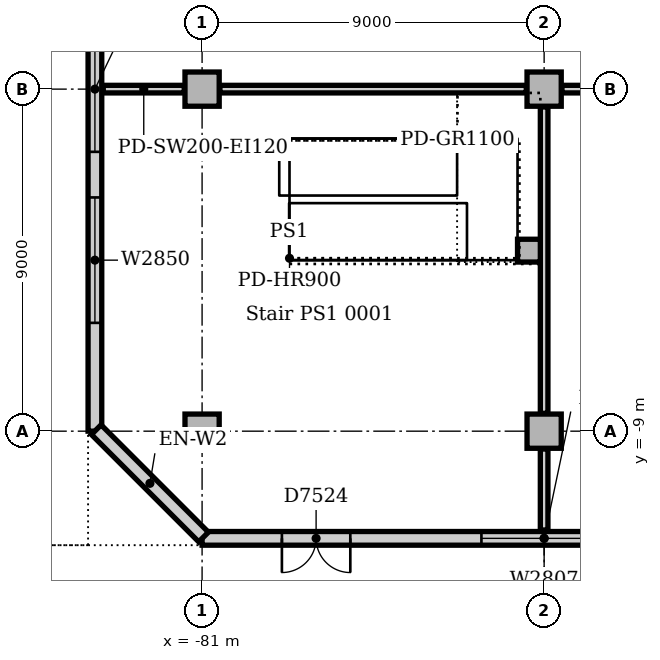
"""IFC4 building model, lengths in metres.
Left out: names, types, materials, properties, quantities, classifications, styles, units other than length and angle.
Written with IfcOpenShell. Run it as: python <this file> out.ifc"""

import sys

from ifc_helpers import new_model, si_unit, direction, frame, frame_2d, origin, origin_2d, place, context, subcontext, project, spatial, rectangle, extrude, element, fill, save


model = new_model("IFC4")
c1 = context("Model", 3, precision=1e-05, world=origin(), true_north=direction((0.0, 1.0)))
c2 = subcontext(c1, "Body", "Model", "MODEL_VIEW")
j1 = project(units=[si_unit("LENGTHUNIT", "METRE"), si_unit("PLANEANGLEUNIT", "RADIAN")], contexts=[c1])
p1 = place(None, origin())
s1 = spatial("IfcSite", under=j1, at=p1, CompositionType="ELEMENT")
p2 = place(p1, origin())
s2 = spatial("IfcBuilding", under=s1, at=p2, CompositionType="ELEMENT")
p3 = place(p2, origin())
s3 = spatial("IfcBuildingStorey", under=s2, at=p3, CompositionType="ELEMENT", Elevation=0.0)
for number, where, z_axis, x_axis in (
    (1, (-81.0, -9.0, 0.0), (0.0, 0.0, 1.0), (1.0, 0.0, 0.0)),
    (2, (-81.0, 0.0, 0.0), (0.0, 0.0, 1.0), (1.0, 0.0, 0.0)),
    (3, (-72.0, -9.0, 0.0), (0.0, 0.0, 1.0), (1.0, 0.0, 0.0)),
    (4, (-72.0, 0.0, 0.0), (0.0, 0.0, 1.0), (1.0, 0.0, 0.0)),
):
    element("IfcColumn", number, at=place(p3, frame(where, z_axis=z_axis, x_axis=x_axis)), inside=s3, PredefinedType="COLUMN", context=c2, shape_type="SweptSolid", body=[
        extrude(rectangle(XDim=0.9, YDim=0.9, at=origin_2d()), origin(), (0.0, 0.0, 1.0), 5.7),
    ])
p4 = place(p3, frame((-81.0, -11.82, 0.0), z_axis=(0.0, 0.0, 1.0), x_axis=(1.0, 0.0, 0.0)))
e5 = element("IfcWall", 5, at=p4, inside=s3, PredefinedType="STANDARD", context=c2, shape_type="SweptSolid", body=[
    extrude(rectangle(XDim=54.0, YDim=0.36, at=frame_2d((27.0, 0.0))), origin(), (0.0, 0.0, 1.0), 5.7),
])
p5 = place(p4, frame((22.8, 0.0, 0.0)))
e6 = element("IfcOpeningElement", 6, at=p5, cuts=e5, PredefinedType="OPENING", context=c2, shape_type="SweptSolid", body=[
    extrude(rectangle(XDim=2.4, YDim=2.4, at=frame_2d((1.2, 1.2))), frame((0.0, 0.19, 0.0), z_axis=(0.0, -1.0, 0.0), x_axis=(1.0, 0.0, 0.0)), (0.0, 0.0, 1.0), 0.38),
])
p6 = place(p4, frame((13.8, 0.0, 0.0)))
e7 = element("IfcOpeningElement", 7, at=p6, cuts=e5, PredefinedType="OPENING", context=c2, shape_type="SweptSolid", body=[
    extrude(rectangle(XDim=2.4, YDim=2.2, at=frame_2d((1.2, 1.1))), frame((0.0, 0.19, 0.0), z_axis=(0.0, -1.0, 0.0), x_axis=(1.0, 0.0, 0.0)), (0.0, 0.0, 1.0), 0.38),
])
p7 = place(p4, frame((39.3, 0.0, 0.0)))
e8 = element("IfcOpeningElement", 8, at=p7, cuts=e5, PredefinedType="OPENING", context=c2, shape_type="SweptSolid", body=[
    extrude(rectangle(XDim=2.4, YDim=2.2, at=frame_2d((1.2, 1.1))), frame((0.0, 0.19, 0.0), z_axis=(0.0, -1.0, 0.0), x_axis=(1.0, 0.0, 0.0)), (0.0, 0.0, 1.0), 0.38),
])
p8 = place(p4, frame((2.1, 0.0, 0.0)))
e9 = element("IfcOpeningElement", 9, at=p8, cuts=e5, PredefinedType="OPENING", context=c2, shape_type="SweptSolid", body=[
    extrude(rectangle(XDim=1.8, YDim=2.2, at=frame_2d((0.9, 1.1))), frame((0.0, 0.19, 0.0), z_axis=(0.0, -1.0, 0.0), x_axis=(1.0, 0.0, 0.0)), (0.0, 0.0, 1.0), 0.38),
])
p9 = place(p4, frame((30.6, 0.0, 0.0)))
e10 = element("IfcOpeningElement", 10, at=p9, cuts=e5, PredefinedType="OPENING", context=c2, shape_type="SweptSolid", body=[
    extrude(rectangle(XDim=1.8, YDim=2.2, at=frame_2d((0.9, 1.1))), frame((0.0, 0.19, 0.0), z_axis=(0.0, -1.0, 0.0), x_axis=(1.0, 0.0, 0.0)), (0.0, 0.0, 1.0), 0.38),
])
p10 = place(p4, frame((48.6, 0.0, 0.0)))
e11 = element("IfcOpeningElement", 11, at=p10, cuts=e5, PredefinedType="OPENING", context=c2, shape_type="SweptSolid", body=[
    extrude(rectangle(XDim=1.8, YDim=2.2, at=frame_2d((0.9, 1.1))), frame((0.0, 0.19, 0.0), z_axis=(0.0, -1.0, 0.0), x_axis=(1.0, 0.0, 0.0)), (0.0, 0.0, 1.0), 0.38),
])
p11 = place(p4, frame((7.35, 0.0, 0.6)))
e12 = element("IfcOpeningElement", 12, at=p11, cuts=e5, PredefinedType="OPENING", context=c2, shape_type="SweptSolid", body=[
    extrude(rectangle(XDim=3.3, YDim=3.0, at=frame_2d((1.65, 1.5))), frame((0.0, 0.19, 0.0), z_axis=(0.0, -1.0, 0.0), x_axis=(1.0, 0.0, 0.0)), (0.0, 0.0, 1.0), 0.38),
])
p12 = place(p4, frame((34.35, 0.0, 0.6)))
e13 = element("IfcOpeningElement", 13, at=p12, cuts=e5, PredefinedType="OPENING", context=c2, shape_type="SweptSolid", body=[
    extrude(rectangle(XDim=3.3, YDim=3.0, at=frame_2d((1.65, 1.5))), frame((0.0, 0.19, 0.0), z_axis=(0.0, -1.0, 0.0), x_axis=(1.0, 0.0, 0.0)), (0.0, 0.0, 1.0), 0.38),
])
p13 = place(p4, frame((43.35, 0.0, 0.6)))
e14 = element("IfcOpeningElement", 14, at=p13, cuts=e5, PredefinedType="OPENING", context=c2, shape_type="SweptSolid", body=[
    extrude(rectangle(XDim=3.3, YDim=3.0, at=frame_2d((1.65, 1.5))), frame((0.0, 0.19, 0.0), z_axis=(0.0, -1.0, 0.0), x_axis=(1.0, 0.0, 0.0)), (0.0, 0.0, 1.0), 0.38),
])
p14 = place(p3, frame((-83.82, 54.0, 0.0), z_axis=(0.0, 0.0, 1.0), x_axis=(0.0, -1.0, 0.0)))
e15 = element("IfcWall", 15, at=p14, inside=s3, PredefinedType="STANDARD", context=c2, shape_type="SweptSolid", body=[
    extrude(rectangle(XDim=63.0, YDim=0.36, at=frame_2d((31.5, 0.0))), origin(), (0.0, 0.0, 1.0), 5.7),
])
p15 = place(p14, frame((41.4, 0.0, 0.0)))
e16 = element("IfcOpeningElement", 16, at=p15, cuts=e15, PredefinedType="OPENING", context=c2, shape_type="SweptSolid", body=[
    extrude(rectangle(XDim=1.2, YDim=2.2, at=frame_2d((0.6, 1.1))), frame((0.0, 0.19, 0.0), z_axis=(0.0, -1.0, 0.0), x_axis=(1.0, 0.0, 0.0)), (0.0, 0.0, 1.0), 0.38),
])
p16 = place(p14, frame((30.3, 0.0, 0.0)))
e17 = element("IfcOpeningElement", 17, at=p16, cuts=e15, PredefinedType="OPENING", context=c2, shape_type="SweptSolid", body=[
    extrude(rectangle(XDim=2.4, YDim=2.2, at=frame_2d((1.2, 1.1))), frame((0.0, 0.19, 0.0), z_axis=(0.0, -1.0, 0.0), x_axis=(1.0, 0.0, 0.0)), (0.0, 0.0, 1.0), 0.38),
])
p17 = place(p14, frame((11.85, 0.0, 0.6)))
e18 = element("IfcOpeningElement", 18, at=p17, cuts=e15, PredefinedType="OPENING", context=c2, shape_type="SweptSolid", body=[
    extrude(rectangle(XDim=3.3, YDim=3.0, at=frame_2d((1.65, 1.5))), frame((0.0, 0.19, 0.0), z_axis=(0.0, -1.0, 0.0), x_axis=(1.0, 0.0, 0.0)), (0.0, 0.0, 1.0), 0.38),
])
p18 = place(p14, frame((16.35, 0.0, 0.6)))
e19 = element("IfcOpeningElement", 19, at=p18, cuts=e15, PredefinedType="OPENING", context=c2, shape_type="SweptSolid", body=[
    extrude(rectangle(XDim=3.3, YDim=3.0, at=frame_2d((1.65, 1.5))), frame((0.0, 0.19, 0.0), z_axis=(0.0, -1.0, 0.0), x_axis=(1.0, 0.0, 0.0)), (0.0, 0.0, 1.0), 0.38),
])
p19 = place(p14, frame((20.85, 0.0, 0.6)))
e20 = element("IfcOpeningElement", 20, at=p19, cuts=e15, PredefinedType="OPENING", context=c2, shape_type="SweptSolid", body=[
    extrude(rectangle(XDim=3.3, YDim=3.0, at=frame_2d((1.65, 1.5))), frame((0.0, 0.19, 0.0), z_axis=(0.0, -1.0, 0.0), x_axis=(1.0, 0.0, 0.0)), (0.0, 0.0, 1.0), 0.38),
])
p20 = place(p14, frame((25.35, 0.0, 0.6)))
e21 = element("IfcOpeningElement", 21, at=p20, cuts=e15, PredefinedType="OPENING", context=c2, shape_type="SweptSolid", body=[
    extrude(rectangle(XDim=3.3, YDim=3.0, at=frame_2d((1.65, 1.5))), frame((0.0, 0.19, 0.0), z_axis=(0.0, -1.0, 0.0), x_axis=(1.0, 0.0, 0.0)), (0.0, 0.0, 1.0), 0.38),
])
p21 = place(p14, frame((34.35, 0.0, 0.6)))
e22 = element("IfcOpeningElement", 22, at=p21, cuts=e15, PredefinedType="OPENING", context=c2, shape_type="SweptSolid", body=[
    extrude(rectangle(XDim=3.3, YDim=3.0, at=frame_2d((1.65, 1.5))), frame((0.0, 0.19, 0.0), z_axis=(0.0, -1.0, 0.0), x_axis=(1.0, 0.0, 0.0)), (0.0, 0.0, 1.0), 0.38),
])
p22 = place(p14, frame((43.35, 0.0, 0.6)))
e23 = element("IfcOpeningElement", 23, at=p22, cuts=e15, PredefinedType="OPENING", context=c2, shape_type="SweptSolid", body=[
    extrude(rectangle(XDim=3.3, YDim=3.0, at=frame_2d((1.65, 1.5))), frame((0.0, 0.19, 0.0), z_axis=(0.0, -1.0, 0.0), x_axis=(1.0, 0.0, 0.0)), (0.0, 0.0, 1.0), 0.38),
])
p23 = place(p14, frame((47.85, 0.0, 0.6)))
e24 = element("IfcOpeningElement", 24, at=p23, cuts=e15, PredefinedType="OPENING", context=c2, shape_type="SweptSolid", body=[
    extrude(rectangle(XDim=3.3, YDim=3.0, at=frame_2d((1.65, 1.5))), frame((0.0, 0.19, 0.0), z_axis=(0.0, -1.0, 0.0), x_axis=(1.0, 0.0, 0.0)), (0.0, 0.0, 1.0), 0.38),
])
p24 = place(p14, frame((52.35, 0.0, 0.6)))
e25 = element("IfcOpeningElement", 25, at=p24, cuts=e15, PredefinedType="OPENING", context=c2, shape_type="SweptSolid", body=[
    extrude(rectangle(XDim=3.3, YDim=3.0, at=frame_2d((1.65, 1.5))), frame((0.0, 0.19, 0.0), z_axis=(0.0, -1.0, 0.0), x_axis=(1.0, 0.0, 0.0)), (0.0, 0.0, 1.0), 0.38),
])
p25 = place(p14, frame((56.85, 0.0, 0.6)))
e26 = element("IfcOpeningElement", 26, at=p25, cuts=e15, PredefinedType="OPENING", context=c2, shape_type="SweptSolid", body=[
    extrude(rectangle(XDim=3.3, YDim=3.0, at=frame_2d((1.65, 1.5))), frame((0.0, 0.19, 0.0), z_axis=(0.0, -1.0, 0.0), x_axis=(1.0, 0.0, 0.0)), (0.0, 0.0, 1.0), 0.38),
])
p26 = place(p3, frame((-83.784, -8.961, 0.0), z_axis=(0.0, 0.0, 1.0), x_axis=(0.707106781187, -0.707106781187, 0.0)))
e27 = element("IfcWall", 27, at=p26, inside=s3, PredefinedType="STANDARD", context=c2, shape_type="SweptSolid", body=[
    extrude(rectangle(XDim=3.993, YDim=0.36, at=frame_2d((1.996, 0.0))), origin(), (0.0, 0.0, 1.0), 5.7),
])
p27 = place(p3, frame((-72.4, -4.25, 0.0), z_axis=(0.0, 0.0, 1.0), x_axis=(1.0, 0.0, 0.0)))
e28 = element("IfcColumn", 28, at=p27, inside=s3, PredefinedType="COLUMN", context=c2, shape_type="SweptSolid", body=[
    extrude(rectangle(XDim=0.6, YDim=0.6, at=origin_2d()), origin(), (0.0, 0.0, 1.0), 6.0),
])
p28 = place(p3, frame((-83.6, 0.0, 0.0), z_axis=(0.0, 0.0, 1.0), x_axis=(1.0, 0.0, 0.0)))
e29 = element("IfcWall", 29, at=p28, inside=s3, PredefinedType="SOLIDWALL", context=c2, shape_type="SweptSolid", body=[
    extrude(rectangle(XDim=2.13, YDim=0.2, at=frame_2d((1.065, 0.0))), origin(), (0.0, 0.0, 1.0), 5.7),
])
p29 = place(p3, frame((-80.53, 0.0, 0.0), z_axis=(0.0, 0.0, 1.0), x_axis=(1.0, 0.0, 0.0)))
e30 = element("IfcWall", 30, at=p29, inside=s3, PredefinedType="SOLIDWALL", context=c2, shape_type="SweptSolid", body=[
    extrude(rectangle(XDim=8.06, YDim=0.2, at=frame_2d((4.03, 0.0))), origin(), (0.0, 0.0, 1.0), 5.7),
])
p30 = place(p3, frame((-72.0, -11.6, 0.0), z_axis=(0.0, 0.0, 1.0), x_axis=(0.0, 1.0, 0.0)))
e31 = element("IfcWall", 31, at=p30, inside=s3, PredefinedType="SOLIDWALL", context=c2, shape_type="SweptSolid", body=[
    extrude(rectangle(XDim=2.13, YDim=0.2, at=frame_2d((1.065, 0.0))), origin(), (0.0, 0.0, 1.0), 5.7),
])
p31 = place(p3, frame((-72.0, -8.53, 0.0), z_axis=(0.0, 0.0, 1.0), x_axis=(0.0, 1.0, 0.0)))
e32 = element("IfcWall", 32, at=p31, inside=s3, PredefinedType="SOLIDWALL", context=c2, shape_type="SweptSolid", body=[
    extrude(rectangle(XDim=8.06, YDim=0.2, at=frame_2d((4.03, 0.0))), origin(), (0.0, 0.0, 1.0), 5.7),
])
p32 = place(p3, frame((-71.53, 0.0, 0.0), z_axis=(0.0, 0.0, 1.0), x_axis=(1.0, 0.0, 0.0)))
e33 = element("IfcWall", 33, at=p32, inside=s3, PredefinedType="PARTITIONING", context=c2, shape_type="SweptSolid", body=[
    extrude(rectangle(XDim=8.53, YDim=0.2, at=frame_2d((4.265, 0.0))), origin(), (0.0, 0.0, 1.0), 5.7),
])
p33 = place(p8, frame((1.8, 0.0, 0.0), z_axis=(0.0, 0.0, 1.0), x_axis=(-1.0, 0.0, 0.0)))
e34 = element("IfcDoor", 34, at=p33, inside=s3, OperationType="DOUBLE_DOOR_SINGLE_SWING", PredefinedType="DOOR", context=c2, shape_type="SweptSolid", body=[
    extrude(rectangle(XDim=1.8, YDim=2.2, at=frame_2d((0.9, 1.1))), frame((0.0, -0.07, 0.0), z_axis=(0.0, -1.0, 0.0), x_axis=(1.0, 0.0, 0.0)), (0.0, 0.0, 1.0), 0.05),
])
fill(e9, e34)
p34 = place(p11, origin())
e35 = element("IfcWindow", 35, at=p34, inside=s3, PartitioningType="SINGLE_PANEL", PredefinedType="WINDOW", context=c2, shape_type="SweptSolid", body=[
    extrude(rectangle(XDim=3.3, YDim=3.0, at=frame_2d((1.65, 1.5))), frame((0.0, 0.13, 0.0), z_axis=(0.0, -1.0, 0.0), x_axis=(1.0, 0.0, 0.0)), (0.0, 0.0, 1.0), 0.06),
])
fill(e12, e35)
p35 = place(p24, origin())
e36 = element("IfcWindow", 36, at=p35, inside=s3, PartitioningType="SINGLE_PANEL", PredefinedType="WINDOW", context=c2, shape_type="SweptSolid", body=[
    extrude(rectangle(XDim=3.3, YDim=3.0, at=frame_2d((1.65, 1.5))), frame((0.0, 0.13, 0.0), z_axis=(0.0, -1.0, 0.0), x_axis=(1.0, 0.0, 0.0)), (0.0, 0.0, 1.0), 0.06),
])
fill(e25, e36)
p36 = place(p25, origin())
e37 = element("IfcWindow", 37, at=p36, inside=s3, PartitioningType="SINGLE_PANEL", PredefinedType="WINDOW", context=c2, shape_type="SweptSolid", body=[
    extrude(rectangle(XDim=3.3, YDim=3.0, at=frame_2d((1.65, 1.5))), frame((0.0, 0.13, 0.0), z_axis=(0.0, -1.0, 0.0), x_axis=(1.0, 0.0, 0.0)), (0.0, 0.0, 1.0), 0.06),
])
fill(e26, e37)
save(model, sys.argv[1])
